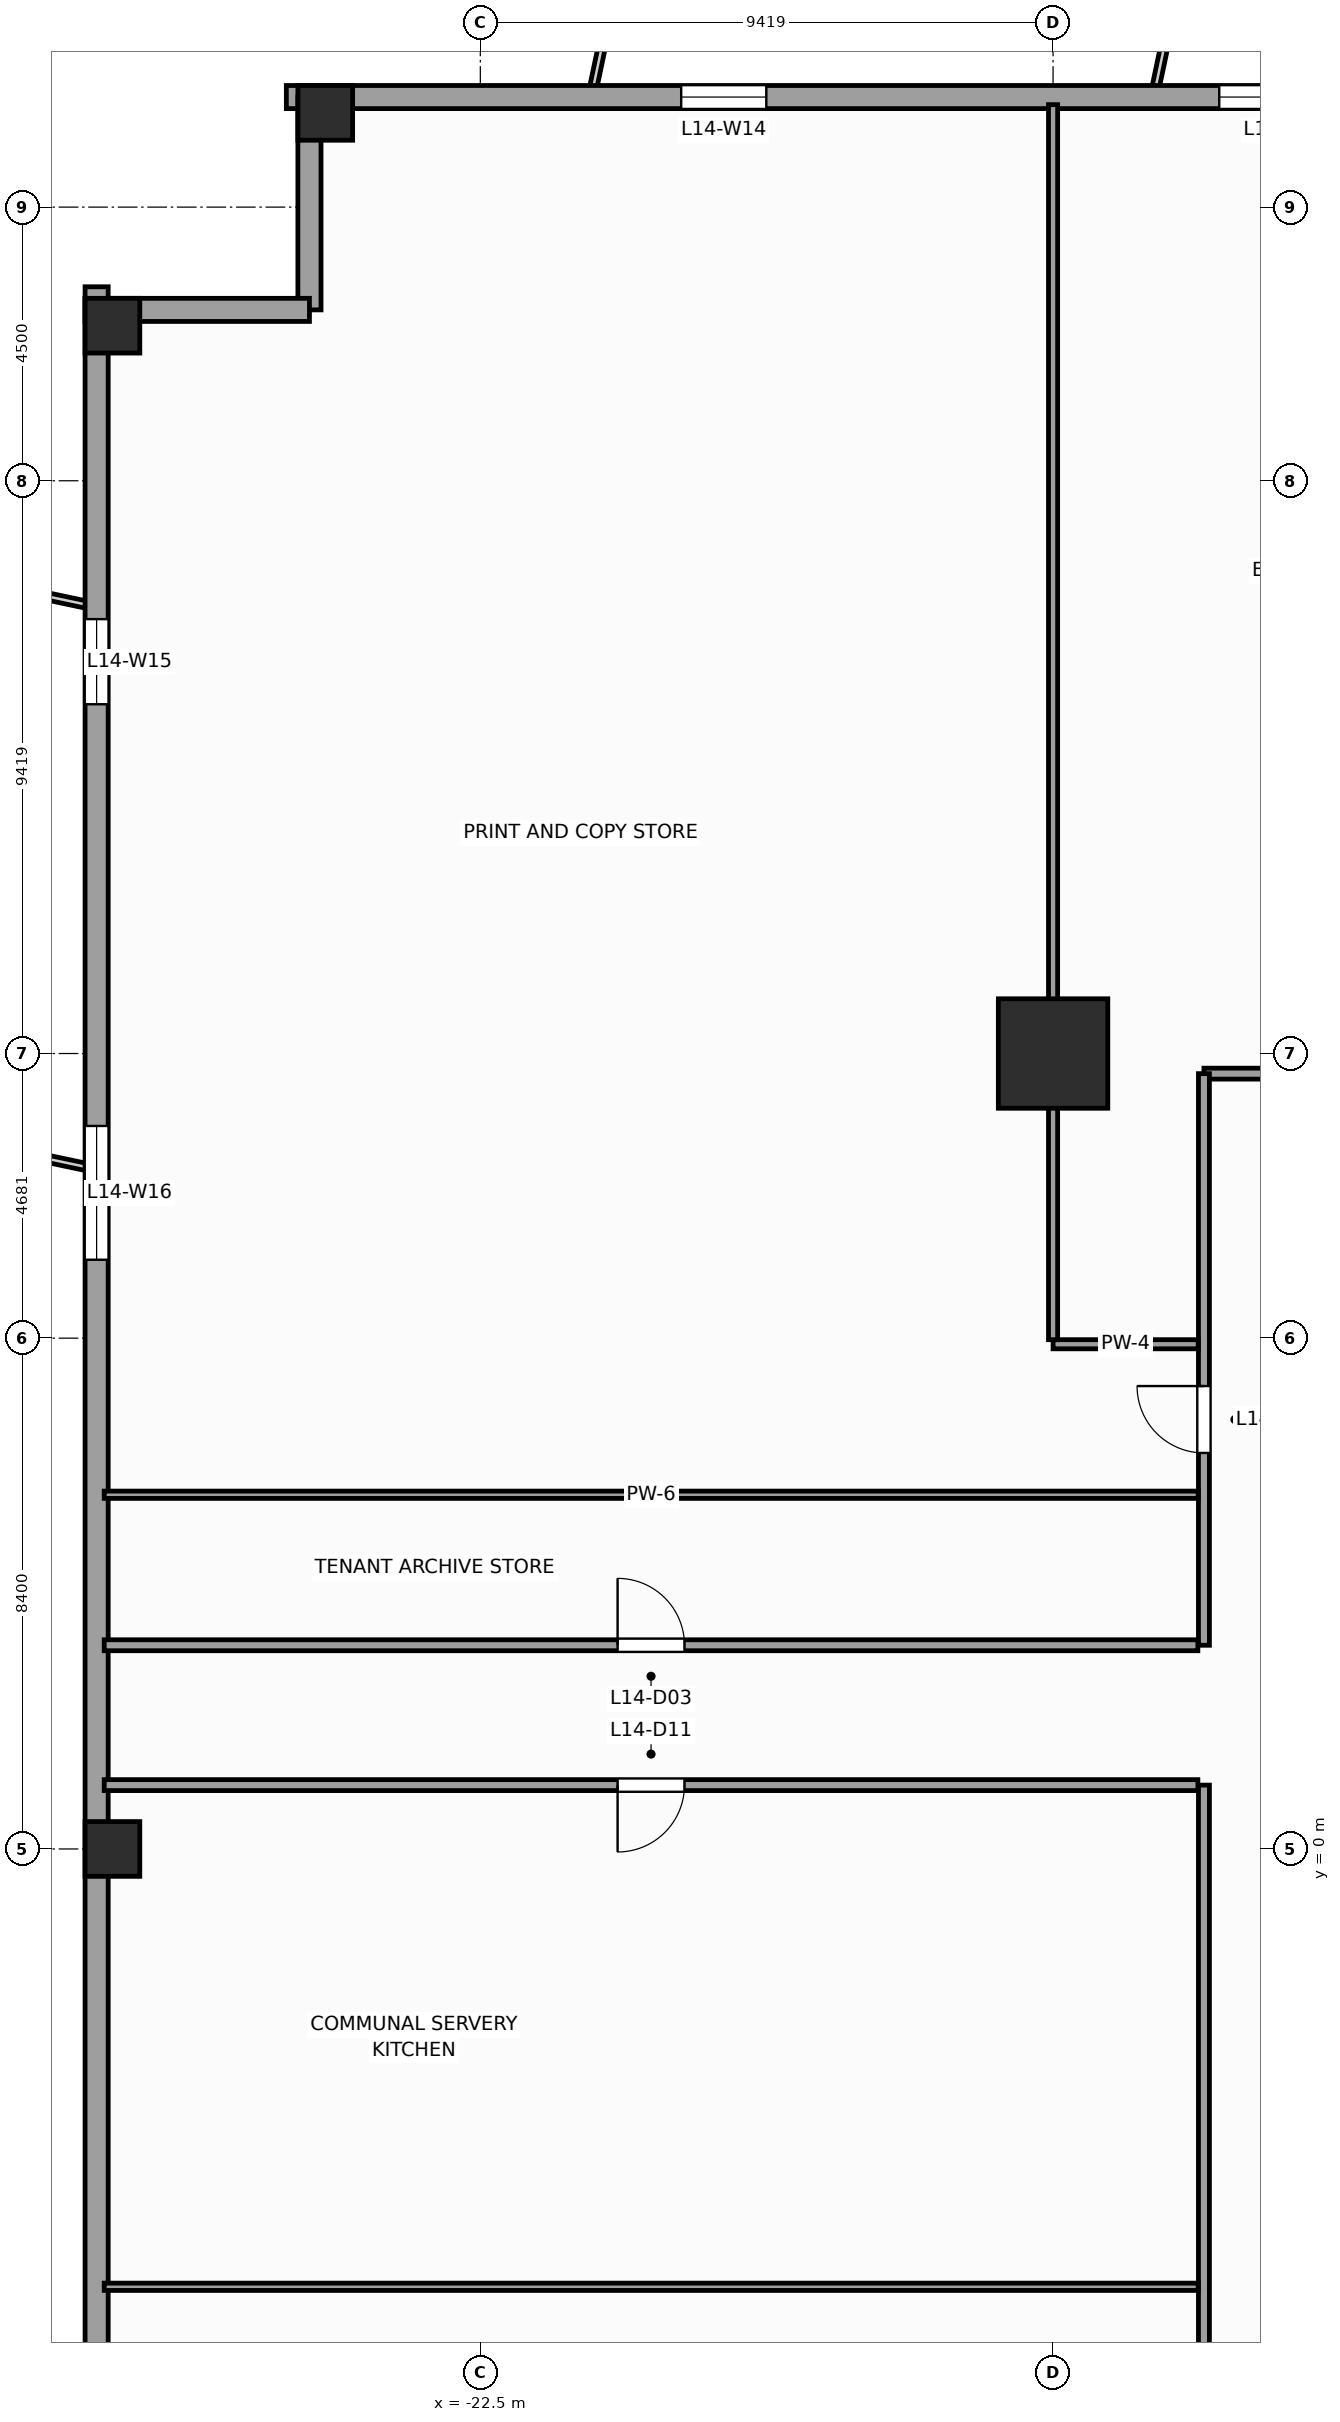
"""IFC4 building model, lengths in metres.
Left out: names, types, materials, properties, quantities, classifications, styles, units other than length and angle.
Written with IfcOpenShell. Run it as: python <this file> out.ifc"""

import sys

from ifc_helpers import new_model, si_unit, direction, frame, frame_2d, origin, origin_2d, place, context, subcontext, project, spatial, rectangle, extrude, source, transform, mapped, element, fill, save


model = new_model("IFC4")
c1 = context("Model", 3, precision=1e-05, world=origin(), true_north=direction((0.0, 1.0)))
c2 = subcontext(c1, "Body", "Model", "MODEL_VIEW")
j1 = project(units=[si_unit("LENGTHUNIT", "METRE"), si_unit("PLANEANGLEUNIT", "RADIAN")], contexts=[c1])
p1 = place(None, origin())
s1 = spatial("IfcSite", under=j1, at=p1, CompositionType="ELEMENT")
p2 = place(p1, origin())
s2 = spatial("IfcBuilding", under=s1, at=p2, CompositionType="ELEMENT")
p3 = place(p2, frame((0.0, 0.0, 62.0)))
s3 = spatial("IfcBuildingStorey", under=s2, at=p3, CompositionType="ELEMENT", Elevation=62.0)
m1 = source(origin(), c2, "Body", "SweptSolid", [
    extrude(rectangle(XDim=1.8, YDim=1.8, at=origin_2d()), origin(), (0.0, 0.0, 1.0), 4.0),
])
p4 = place(p3, frame((-13.081, 13.081, 0.0), z_axis=(0.0, 0.0, 1.0), x_axis=(1.0, 0.0, 0.0)))
e1 = element("IfcColumn", 1, at=p4, inside=s3, PredefinedType="COLUMN", context=c2, shape_type="MappedRepresentation", body=[
    mapped(m1, transform((0.0, 0.0, 0.0), scale=1.0)),
])
m2 = source(origin(), c2, "Body", "SweptSolid", [
    extrude(rectangle(XDim=0.9, YDim=0.9, at=origin_2d()), origin(), (0.0, 0.0, 1.0), 4.0),
])
for number, where, z_axis, x_axis in (
    (2, (-25.05, 28.55, 0.0), (0.0, 0.0, 1.0), (1.0, 0.0, 0.0)),
    (3, (-28.55, 25.05, 0.0), (0.0, 0.0, 1.0), (1.0, 0.0, 0.0)),
    (4, (-28.55, 0.0, 0.0), (0.0, 0.0, 1.0), (1.0, 0.0, 0.0)),
):
    element("IfcColumn", number, at=place(p3, frame(where, z_axis=z_axis, x_axis=x_axis)), inside=s3, PredefinedType="COLUMN", context=c2, shape_type="MappedRepresentation", body=[
        mapped(m2, transform((0.0, 0.0, 0.0), scale=1.0)),
    ])
p5 = place(p3, frame((25.69, 28.81, 0.0), z_axis=(0.0, 0.0, 1.0), x_axis=(-1.0, 0.0, 0.0)))
e5 = element("IfcWall", 5, at=p5, inside=s3, PredefinedType="STANDARD", context=c2, shape_type="SweptSolid", body=[
    extrude(rectangle(XDim=51.38, YDim=0.38, at=frame_2d((25.69, 0.0))), origin(), (0.0, 0.0, 1.0), 3.12),
])
p6 = place(p5, frame((30.765, 0.0, 0.0)))
e6 = element("IfcOpeningElement", 6, at=p6, cuts=e5, PredefinedType="OPENING", context=c2, shape_type="SweptSolid", body=[
    extrude(rectangle(XDim=1.05, YDim=2.25, at=frame_2d((0.525, 1.125))), frame((0.0, 0.2, 0.0), z_axis=(0.0, -1.0, 0.0), x_axis=(1.0, 0.0, 0.0)), (0.0, 0.0, 1.0), 0.4),
])
p7 = place(p5, frame((5.466, 0.0, 0.49)))
e7 = element("IfcOpeningElement", 7, at=p7, cuts=e5, PredefinedType="OPENING", context=c2, shape_type="SweptSolid", body=[
    extrude(rectangle(XDim=1.4, YDim=2.4, at=frame_2d((0.7, 1.2))), frame((0.0, 0.2, 0.0), z_axis=(0.0, -1.0, 0.0), x_axis=(1.0, 0.0, 0.0)), (0.0, 0.0, 1.0), 0.4),
])
p8 = place(p5, frame((13.8, 0.0, 0.49)))
e8 = element("IfcOpeningElement", 8, at=p8, cuts=e5, PredefinedType="OPENING", context=c2, shape_type="SweptSolid", body=[
    extrude(rectangle(XDim=2.2, YDim=2.4, at=frame_2d((1.1, 1.2))), frame((0.0, 0.2, 0.0), z_axis=(0.0, -1.0, 0.0), x_axis=(1.0, 0.0, 0.0)), (0.0, 0.0, 1.0), 0.4),
])
p9 = place(p5, frame((22.062, 0.0, 0.49)))
e9 = element("IfcOpeningElement", 9, at=p9, cuts=e5, PredefinedType="OPENING", context=c2, shape_type="SweptSolid", body=[
    extrude(rectangle(XDim=2.2, YDim=2.4, at=frame_2d((1.1, 1.2))), frame((0.0, 0.2, 0.0), z_axis=(0.0, -1.0, 0.0), x_axis=(1.0, 0.0, 0.0)), (0.0, 0.0, 1.0), 0.4),
])
p10 = place(p5, frame((33.838, 0.0, 0.49)))
e10 = element("IfcOpeningElement", 10, at=p10, cuts=e5, PredefinedType="OPENING", context=c2, shape_type="SweptSolid", body=[
    extrude(rectangle(XDim=2.2, YDim=2.4, at=frame_2d((1.1, 1.2))), frame((0.0, 0.2, 0.0), z_axis=(0.0, -1.0, 0.0), x_axis=(1.0, 0.0, 0.0)), (0.0, 0.0, 1.0), 0.4),
])
p11 = place(p5, frame((43.487, 0.0, 0.49)))
e11 = element("IfcOpeningElement", 11, at=p11, cuts=e5, PredefinedType="OPENING", context=c2, shape_type="SweptSolid", body=[
    extrude(rectangle(XDim=1.4, YDim=2.4, at=frame_2d((0.7, 1.2))), frame((0.0, 0.2, 0.0), z_axis=(0.0, -1.0, 0.0), x_axis=(1.0, 0.0, 0.0)), (0.0, 0.0, 1.0), 0.4),
])
p12 = place(p3, frame((-25.31, 28.81, 0.0), z_axis=(0.0, 0.0, 1.0), x_axis=(0.0, -1.0, 0.0)))
e12 = element("IfcWall", 12, at=p12, inside=s3, PredefinedType="STANDARD", context=c2, shape_type="SweptSolid", body=[
    extrude(rectangle(XDim=3.5, YDim=0.38, at=frame_2d((1.75, 0.0))), origin(), (0.0, 0.0, 1.0), 3.72),
])
p13 = place(p3, frame((-25.31, 25.31, 0.0), z_axis=(0.0, 0.0, 1.0), x_axis=(-1.0, 0.0, 0.0)))
e13 = element("IfcWall", 13, at=p13, inside=s3, PredefinedType="STANDARD", context=c2, shape_type="SweptSolid", body=[
    extrude(rectangle(XDim=3.69, YDim=0.38, at=frame_2d((1.845, 0.0))), origin(), (0.0, 0.0, 1.0), 3.72),
])
p14 = place(p3, frame((-28.81, 25.69, 0.0), z_axis=(0.0, 0.0, 1.0), x_axis=(0.0, -1.0, 0.0)))
e14 = element("IfcWall", 14, at=p14, inside=s3, PredefinedType="STANDARD", context=c2, shape_type="SweptSolid", body=[
    extrude(rectangle(XDim=51.38, YDim=0.38, at=frame_2d((25.69, 0.0))), origin(), (0.0, 0.0, 1.0), 3.12),
])
p15 = place(p14, frame((5.466, 0.0, 0.49)))
e15 = element("IfcOpeningElement", 15, at=p15, cuts=e14, PredefinedType="OPENING", context=c2, shape_type="SweptSolid", body=[
    extrude(rectangle(XDim=1.4, YDim=2.4, at=frame_2d((0.7, 1.2))), frame((0.0, 0.2, 0.0), z_axis=(0.0, -1.0, 0.0), x_axis=(1.0, 0.0, 0.0)), (0.0, 0.0, 1.0), 0.4),
])
p16 = place(p14, frame((13.8, 0.0, 0.49)))
e16 = element("IfcOpeningElement", 16, at=p16, cuts=e14, PredefinedType="OPENING", context=c2, shape_type="SweptSolid", body=[
    extrude(rectangle(XDim=2.2, YDim=2.4, at=frame_2d((1.1, 1.2))), frame((0.0, 0.2, 0.0), z_axis=(0.0, -1.0, 0.0), x_axis=(1.0, 0.0, 0.0)), (0.0, 0.0, 1.0), 0.4),
])
p17 = place(p14, frame((33.838, 0.0, 0.49)))
e17 = element("IfcOpeningElement", 17, at=p17, cuts=e14, PredefinedType="OPENING", context=c2, shape_type="SweptSolid", body=[
    extrude(rectangle(XDim=2.2, YDim=2.4, at=frame_2d((1.1, 1.2))), frame((0.0, 0.2, 0.0), z_axis=(0.0, -1.0, 0.0), x_axis=(1.0, 0.0, 0.0)), (0.0, 0.0, 1.0), 0.4),
])
p18 = place(p14, frame((43.487, 0.0, 0.49)))
e18 = element("IfcOpeningElement", 18, at=p18, cuts=e14, PredefinedType="OPENING", context=c2, shape_type="SweptSolid", body=[
    extrude(rectangle(XDim=1.4, YDim=2.4, at=frame_2d((0.7, 1.2))), frame((0.0, 0.2, 0.0), z_axis=(0.0, -1.0, 0.0), x_axis=(1.0, 0.0, 0.0)), (0.0, 0.0, 1.0), 0.4),
])
p19 = place(p3, frame((-10.6, 12.75, 0.0), z_axis=(0.0, 0.0, 1.0), x_axis=(1.0, 0.0, 0.0)))
e19 = element("IfcWall", 19, at=p19, inside=s3, PredefinedType="PARTITIONING", context=c2, shape_type="SweptSolid", body=[
    extrude(rectangle(XDim=21.2, YDim=0.18, at=frame_2d((10.6, 0.0))), origin(), (0.0, 0.0, 1.0), 3.72),
])
p20 = place(p19, frame((16.636, 0.0, 0.0)))
e20 = element("IfcOpeningElement", 20, at=p20, cuts=e19, PredefinedType="OPENING", context=c2, shape_type="SweptSolid", body=[
    extrude(rectangle(XDim=0.95, YDim=2.1, at=frame_2d((0.475, 1.05))), frame((0.0, 0.1, 0.0), z_axis=(0.0, -1.0, 0.0), x_axis=(1.0, 0.0, 0.0)), (0.0, 0.0, 1.0), 0.2),
])
p21 = place(p19, frame((3.314, 0.0, 0.0)))
e21 = element("IfcOpeningElement", 21, at=p21, cuts=e19, PredefinedType="OPENING", context=c2, shape_type="SweptSolid", body=[
    extrude(rectangle(XDim=1.1, YDim=2.2, at=frame_2d((0.55, 1.1))), frame((0.0, 0.1, 0.0), z_axis=(0.0, -1.0, 0.0), x_axis=(1.0, 0.0, 0.0)), (0.0, 0.0, 1.0), 0.2),
])
p22 = place(p19, frame((11.05, 0.0, 0.0)))
e22 = element("IfcOpeningElement", 22, at=p22, cuts=e19, PredefinedType="OPENING", context=c2, shape_type="SweptSolid", body=[
    extrude(rectangle(XDim=1.1, YDim=2.2, at=frame_2d((0.55, 1.1))), frame((0.0, 0.1, 0.0), z_axis=(0.0, -1.0, 0.0), x_axis=(1.0, 0.0, 0.0)), (0.0, 0.0, 1.0), 0.2),
])
p23 = place(p3, frame((-10.6, -11.7, 0.0), z_axis=(0.0, 0.0, 1.0), x_axis=(0.0, 1.0, 0.0)))
e23 = element("IfcWall", 23, at=p23, inside=s3, PredefinedType="PARTITIONING", context=c2, shape_type="SweptSolid", body=[
    extrude(rectangle(XDim=12.75, YDim=0.18, at=frame_2d((6.375, 0.0))), origin(), (0.0, 0.0, 1.0), 3.72),
])
p24 = place(p3, frame((-10.6, 3.35, 0.0), z_axis=(0.0, 0.0, 1.0), x_axis=(0.0, 1.0, 0.0)))
e24 = element("IfcWall", 24, at=p24, inside=s3, PredefinedType="PARTITIONING", context=c2, shape_type="SweptSolid", body=[
    extrude(rectangle(XDim=9.4, YDim=0.18, at=frame_2d((4.7, 0.0))), origin(), (0.0, 0.0, 1.0), 3.72),
])
p25 = place(p24, frame((3.163, 0.0, 0.0)))
e25 = element("IfcOpeningElement", 25, at=p25, cuts=e24, PredefinedType="OPENING", context=c2, shape_type="SweptSolid", body=[
    extrude(rectangle(XDim=1.1, YDim=2.2, at=frame_2d((0.55, 1.1))), frame((0.0, 0.1, 0.0), z_axis=(0.0, -1.0, 0.0), x_axis=(1.0, 0.0, 0.0)), (0.0, 0.0, 1.0), 0.2),
])
p26 = place(p3, frame((-28.685, 1.05, 0.0), z_axis=(0.0, 0.0, 1.0), x_axis=(1.0, 0.0, 0.0)))
e26 = element("IfcWall", 26, at=p26, inside=s3, PredefinedType="PARTITIONING", context=c2, shape_type="SweptSolid", body=[
    extrude(rectangle(XDim=17.985, YDim=0.18, at=frame_2d((8.993, 0.0))), origin(), (0.0, 0.0, 1.0), 3.72),
])
p27 = place(p26, frame((8.442, 0.0, 0.0)))
e27 = element("IfcOpeningElement", 27, at=p27, cuts=e26, PredefinedType="OPENING", context=c2, shape_type="SweptSolid", body=[
    extrude(rectangle(XDim=1.1, YDim=2.2, at=frame_2d((0.55, 1.1))), frame((0.0, 0.1, 0.0), z_axis=(0.0, -1.0, 0.0), x_axis=(1.0, 0.0, 0.0)), (0.0, 0.0, 1.0), 0.2),
])
p28 = place(p3, frame((-28.685, 3.35, 0.0), z_axis=(0.0, 0.0, 1.0), x_axis=(1.0, 0.0, 0.0)))
e28 = element("IfcWall", 28, at=p28, inside=s3, PredefinedType="PARTITIONING", context=c2, shape_type="SweptSolid", body=[
    extrude(rectangle(XDim=17.985, YDim=0.18, at=frame_2d((8.993, 0.0))), origin(), (0.0, 0.0, 1.0), 3.72),
])
p29 = place(p28, frame((8.442, 0.0, 0.0)))
e29 = element("IfcOpeningElement", 29, at=p29, cuts=e28, PredefinedType="OPENING", context=c2, shape_type="SweptSolid", body=[
    extrude(rectangle(XDim=1.1, YDim=2.2, at=frame_2d((0.55, 1.1))), frame((0.0, 0.1, 0.0), z_axis=(0.0, -1.0, 0.0), x_axis=(1.0, 0.0, 0.0)), (0.0, 0.0, 1.0), 0.2),
])
p30 = place(p3, frame((-10.695, 8.3, 0.0), z_axis=(0.0, 0.0, 1.0), x_axis=(-1.0, 0.0, 0.0)))
e30 = element("IfcWall", 30, at=p30, inside=s3, PredefinedType="PARTITIONING", context=c2, shape_type="SweptSolid", body=[
    extrude(rectangle(XDim=2.386, YDim=0.15, at=frame_2d((1.193, 0.0))), origin(), (0.0, 0.0, 1.0), 3.72),
])
p31 = place(p3, frame((-13.081, 8.375, 0.0), z_axis=(0.0, 0.0, 1.0), x_axis=(0.0, 1.0, 0.0)))
e31 = element("IfcWall", 31, at=p31, inside=s3, PredefinedType="PARTITIONING", context=c2, shape_type="SweptSolid", body=[
    extrude(rectangle(XDim=20.31, YDim=0.15, at=frame_2d((10.155, 0.0))), origin(), (0.0, 0.0, 1.0), 2.712),
])
for number, where, z_axis, x_axis in (
    (32, (-28.685, 5.825, 0.0), (0.0, 0.0, 1.0), (1.0, 0.0, 0.0)),
    (33, (-28.685, -7.2, 0.0), (0.0, 0.0, 1.0), (1.0, 0.0, 0.0)),
):
    element("IfcWall", number, at=place(p3, frame(where, z_axis=z_axis, x_axis=x_axis)), inside=s3, PredefinedType="PARTITIONING", context=c2, shape_type="SweptSolid", body=[
        extrude(rectangle(XDim=17.99, YDim=0.12, at=frame_2d((8.995, 0.0))), origin(), (0.0, 0.0, 1.0), 3.72),
    ])
m3 = source(origin(), c2, "Body", "SweptSolid", [
    extrude(rectangle(XDim=2.2, YDim=2.4, at=frame_2d((1.1, 1.2))), frame((0.0, 0.03, 0.0), z_axis=(0.0, -1.0, 0.0), x_axis=(1.0, 0.0, 0.0)), (0.0, 0.0, 1.0), 0.06),
])
p32 = place(p10, origin())
e34 = element("IfcWindow", 34, at=p32, inside=s3, PartitioningType="SINGLE_PANEL", PredefinedType="WINDOW", context=c2, shape_type="MappedRepresentation", body=[
    mapped(m3, transform((0.0, 0.0, 0.0), scale=1.0)),
])
fill(e10, e34)
m4 = source(origin(), c2, "Body", "SweptSolid", [
    extrude(rectangle(XDim=1.4, YDim=2.4, at=frame_2d((0.7, 1.2))), frame((0.0, 0.03, 0.0), z_axis=(0.0, -1.0, 0.0), x_axis=(1.0, 0.0, 0.0)), (0.0, 0.0, 1.0), 0.06),
])
p33 = place(p11, origin())
e35 = element("IfcWindow", 35, at=p33, inside=s3, PartitioningType="SINGLE_PANEL", PredefinedType="WINDOW", context=c2, shape_type="MappedRepresentation", body=[
    mapped(m4, transform((0.0, 0.0, 0.0), scale=1.0)),
])
fill(e11, e35)
p34 = place(p15, origin())
e36 = element("IfcWindow", 36, at=p34, inside=s3, PartitioningType="SINGLE_PANEL", PredefinedType="WINDOW", context=c2, shape_type="MappedRepresentation", body=[
    mapped(m4, transform((0.0, 0.0, 0.0), scale=1.0)),
])
fill(e15, e36)
p35 = place(p16, origin())
e37 = element("IfcWindow", 37, at=p35, inside=s3, PartitioningType="SINGLE_PANEL", PredefinedType="WINDOW", context=c2, shape_type="MappedRepresentation", body=[
    mapped(m3, transform((0.0, 0.0, 0.0), scale=1.0)),
])
fill(e16, e37)
m5 = source(origin(), c2, "Body", "SweptSolid", [
    extrude(rectangle(XDim=1.1, YDim=2.2, at=frame_2d((0.55, 1.1))), frame((0.0, 0.025, 0.0), z_axis=(0.0, -1.0, 0.0), x_axis=(1.0, 0.0, 0.0)), (0.0, 0.0, 1.0), 0.05),
])
p36 = place(p29, origin())
e38 = element("IfcDoor", 38, at=p36, inside=s3, OperationType="SINGLE_SWING_LEFT", PredefinedType="DOOR", context=c2, shape_type="MappedRepresentation", body=[
    mapped(m5, transform((0.0, 0.0, 0.0), scale=1.0)),
])
fill(e29, e38)
p37 = place(p25, origin())
e39 = element("IfcDoor", 39, at=p37, inside=s3, OperationType="SINGLE_SWING_RIGHT", PredefinedType="DOOR", context=c2, shape_type="MappedRepresentation", body=[
    mapped(m5, transform((0.0, 0.0, 0.0), scale=1.0)),
])
fill(e25, e39)
p38 = place(p27, frame((1.1, 0.0, 0.0), z_axis=(0.0, 0.0, 1.0), x_axis=(-1.0, 0.0, 0.0)))
e40 = element("IfcDoor", 40, at=p38, inside=s3, OperationType="SINGLE_SWING_LEFT", PredefinedType="DOOR", context=c2, shape_type="MappedRepresentation", body=[
    mapped(m5, transform((0.0, 0.0, 0.0), scale=1.0)),
])
fill(e27, e40)
save(model, sys.argv[1])
